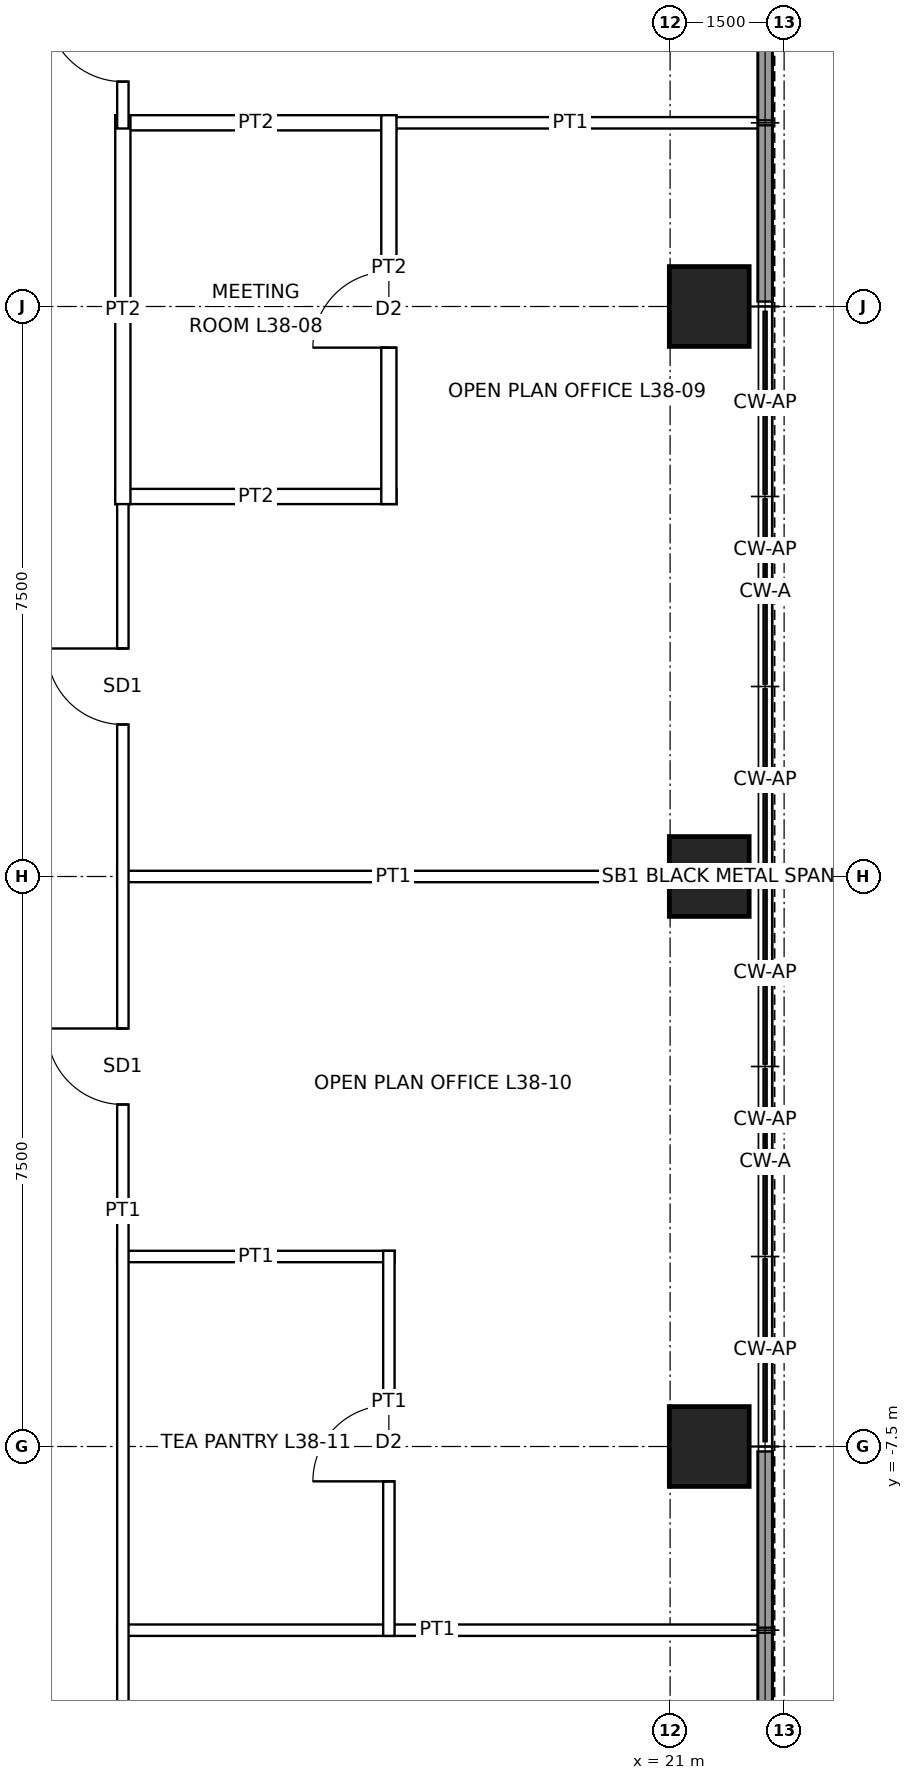
"""IFC4 building model, lengths in metres.
Left out: names, types, materials, properties, quantities, classifications, styles, units other than length and angle.
Written with IfcOpenShell. Run it as: python <this file> out.ifc"""

import sys

from ifc_helpers import new_model, si_unit, direction, frame, frame_2d, origin, origin_2d, place, context, subcontext, project, spatial, rectangle, hollow_rectangle, extrude, element, fill, save


model = new_model("IFC4")
c1 = context("Model", 3, precision=1e-05, world=origin(), true_north=direction((0.0, 1.0)))
c2 = subcontext(c1, "Body", "Model", "MODEL_VIEW")
j1 = project(units=[si_unit("LENGTHUNIT", "METRE"), si_unit("PLANEANGLEUNIT", "RADIAN")], contexts=[c1])
p1 = place(None, origin())
s1 = spatial("IfcSite", under=j1, at=p1, CompositionType="ELEMENT")
p2 = place(p1, origin())
s2 = spatial("IfcBuilding", under=s1, at=p2, CompositionType="ELEMENT")
p3 = place(p2, frame((0.0, 0.0, 185.9)))
s3 = spatial("IfcBuildingStorey", under=s2, at=p3, CompositionType="ELEMENT", Elevation=185.9)
for number, where, z_axis, x_axis in (
    (1, (21.515, 7.5, 0.0), (0.0, 0.0, 1.0), (1.0, 0.0, 0.0)),
    (2, (21.515, 0.0, 0.0), (0.0, 0.0, 1.0), (1.0, 0.0, 0.0)),
    (3, (21.515, -7.5, 0.0), (0.0, 0.0, 1.0), (1.0, 0.0, 0.0)),
):
    element("IfcColumn", number, at=place(p3, frame(where, z_axis=z_axis, x_axis=x_axis)), inside=s3, PredefinedType="COLUMN", context=c2, shape_type="SweptSolid", body=[
        extrude(hollow_rectangle(XDim=1.05, YDim=1.05, WallThickness=0.07, at=origin_2d()), origin(), (0.0, 0.0, 1.0), 4.0),
    ])
p4 = place(p3, frame((22.25, 12.301, 0.0), z_axis=(0.0, 0.0, 1.0), x_axis=(0.0, -1.0, 0.0)))
e4 = element("IfcWall", 4, at=p4, inside=s3, PredefinedType="SOLIDWALL", context=c2, shape_type="SweptSolid", body=[
    extrude(rectangle(XDim=2.352, YDim=0.2, at=frame_2d((1.176, 0.0))), origin(), (0.0, 0.0, 1.0), 3.85),
])
for number, where, z_axis, x_axis in (
    (5, (22.25, 9.884, 0.0), (0.0, 0.0, 1.0), (0.0, -1.0, 0.0)),
    (6, (22.25, -7.565, 0.0), (0.0, 0.0, 1.0), (0.0, -1.0, 0.0)),
):
    element("IfcWall", number, at=place(p3, frame(where, z_axis=z_axis, x_axis=x_axis)), inside=s3, PredefinedType="SOLIDWALL", context=c2, shape_type="SweptSolid", body=[
        extrude(rectangle(XDim=2.319, YDim=0.2, at=frame_2d((1.16, 0.0))), origin(), (0.0, 0.0, 1.0), 3.85),
    ])
p5 = place(p3, frame((22.25, -9.949, 0.0), z_axis=(0.0, 0.0, 1.0), x_axis=(0.0, -1.0, 0.0)))
e7 = element("IfcWall", 7, at=p5, inside=s3, PredefinedType="SOLIDWALL", context=c2, shape_type="SweptSolid", body=[
    extrude(rectangle(XDim=2.352, YDim=0.2, at=frame_2d((1.176, 0.0))), origin(), (0.0, 0.0, 1.0), 3.85),
])
p6 = place(p3, frame((13.725, -9.917, 0.0), z_axis=(0.0, 0.0, 1.0), x_axis=(1.0, 0.0, 0.0)))
e8 = element("IfcWall", 8, at=p6, inside=s3, PredefinedType="PARTITIONING", context=c2, shape_type="SweptSolid", body=[
    extrude(rectangle(XDim=8.425, YDim=0.15, at=frame_2d((4.212, 0.0))), origin(), (0.0, 0.0, 1.0), 3.85),
])
p7 = place(p3, frame((13.725, -5.0, 0.0), z_axis=(0.0, 0.0, 1.0), x_axis=(1.0, 0.0, 0.0)))
e9 = element("IfcWall", 9, at=p7, inside=s3, PredefinedType="PARTITIONING", context=c2, shape_type="SweptSolid", body=[
    extrude(rectangle(XDim=3.65, YDim=0.15, at=frame_2d((1.825, 0.0))), origin(), (0.0, 0.0, 1.0), 3.85),
])
p8 = place(p3, frame((13.725, 0.0, 0.0), z_axis=(0.0, 0.0, 1.0), x_axis=(1.0, 0.0, 0.0)))
e10 = element("IfcWall", 10, at=p8, inside=s3, PredefinedType="PARTITIONING", context=c2, shape_type="SweptSolid", body=[
    extrude(rectangle(XDim=7.265, YDim=0.15, at=frame_2d((3.632, 0.0))), origin(), (0.0, 0.0, 1.0), 3.238),
])
for number, where, z_axis, x_axis in (
    (11, (13.7, 5.0, 0.0), (0.0, 0.0, 1.0), (1.0, 0.0, 0.0)),
    (12, (13.7, 9.917, 0.0), (0.0, 0.0, 1.0), (1.0, 0.0, 0.0)),
):
    element("IfcWall", number, at=place(p3, frame(where, z_axis=z_axis, x_axis=x_axis)), inside=s3, PredefinedType="PARTITIONING", context=c2, shape_type="SweptSolid", body=[
        extrude(rectangle(XDim=3.7, YDim=0.2, at=frame_2d((1.85, 0.0))), origin(), (0.0, 0.0, 1.0), 3.85),
    ])
p9 = place(p3, frame((17.225, 9.917, 0.0), z_axis=(0.0, 0.0, 1.0), x_axis=(1.0, 0.0, 0.0)))
e13 = element("IfcWall", 13, at=p9, inside=s3, PredefinedType="PARTITIONING", context=c2, shape_type="SweptSolid", body=[
    extrude(rectangle(XDim=4.925, YDim=0.15, at=frame_2d((2.462, 0.0))), origin(), (0.0, 0.0, 1.0), 3.85),
])
p10 = place(p3, frame((13.8, -13.875, 0.0), z_axis=(0.0, 0.0, 1.0), x_axis=(0.0, 1.0, 0.0)))
e14 = element("IfcWall", 14, at=p10, inside=s3, PredefinedType="PARTITIONING", context=c2, shape_type="SweptSolid", body=[
    extrude(rectangle(XDim=18.95, YDim=0.15, at=frame_2d((9.475, 0.0))), origin(), (0.0, 0.0, 1.0), 3.85),
])
p11 = place(p10, frame((15.875, 0.0, 0.0)))
e15 = element("IfcOpeningElement", 15, at=p11, cuts=e14, PredefinedType="OPENING", context=c2, shape_type="SweptSolid", body=[
    extrude(rectangle(XDim=1.0, YDim=2.4, at=frame_2d((0.5, 1.2))), frame((0.0, 0.085, 0.0), z_axis=(0.0, -1.0, 0.0), x_axis=(1.0, 0.0, 0.0)), (0.0, 0.0, 1.0), 0.17),
])
p12 = place(p10, frame((10.875, 0.0, 0.0)))
e16 = element("IfcOpeningElement", 16, at=p12, cuts=e14, PredefinedType="OPENING", context=c2, shape_type="SweptSolid", body=[
    extrude(rectangle(XDim=1.0, YDim=2.4, at=frame_2d((0.5, 1.2))), frame((0.0, 0.085, 0.0), z_axis=(0.0, -1.0, 0.0), x_axis=(1.0, 0.0, 0.0)), (0.0, 0.0, 1.0), 0.17),
])
p13 = place(p3, frame((13.8, 4.9, 0.0), z_axis=(0.0, 0.0, 1.0), x_axis=(0.0, 1.0, 0.0)))
e17 = element("IfcWall", 17, at=p13, inside=s3, PredefinedType="PARTITIONING", context=c2, shape_type="SweptSolid", body=[
    extrude(rectangle(XDim=5.117, YDim=0.2, at=frame_2d((2.559, 0.0))), origin(), (0.0, 0.0, 1.0), 3.85),
])
p14 = place(p3, frame((13.8, 9.842, 0.0), z_axis=(0.0, 0.0, 1.0), x_axis=(0.0, 1.0, 0.0)))
e18 = element("IfcWall", 18, at=p14, inside=s3, PredefinedType="PARTITIONING", context=c2, shape_type="SweptSolid", body=[
    extrude(rectangle(XDim=2.233, YDim=0.15, at=frame_2d((1.116, 0.0))), origin(), (0.0, 0.0, 1.0), 3.85),
])
p15 = place(p14, frame((0.616, 0.0, 0.0)))
e19 = element("IfcOpeningElement", 19, at=p15, cuts=e18, PredefinedType="OPENING", context=c2, shape_type="SweptSolid", body=[
    extrude(rectangle(XDim=1.0, YDim=2.4, at=frame_2d((0.5, 1.2))), frame((0.0, 0.085, 0.0), z_axis=(0.0, -1.0, 0.0), x_axis=(1.0, 0.0, 0.0)), (0.0, 0.0, 1.0), 0.17),
])
p16 = place(p3, frame((17.3, -9.992, 0.0), z_axis=(0.0, 0.0, 1.0), x_axis=(0.0, 1.0, 0.0)))
e20 = element("IfcWall", 20, at=p16, inside=s3, PredefinedType="PARTITIONING", context=c2, shape_type="SweptSolid", body=[
    extrude(rectangle(XDim=5.067, YDim=0.15, at=frame_2d((2.533, 0.0))), origin(), (0.0, 0.0, 1.0), 3.85),
])
p17 = place(p16, frame((2.033, 0.0, 0.0)))
e21 = element("IfcOpeningElement", 21, at=p17, cuts=e20, PredefinedType="OPENING", context=c2, shape_type="SweptSolid", body=[
    extrude(rectangle(XDim=1.0, YDim=2.1, at=frame_2d((0.5, 1.05))), frame((0.0, 0.085, 0.0), z_axis=(0.0, -1.0, 0.0), x_axis=(1.0, 0.0, 0.0)), (0.0, 0.0, 1.0), 0.17),
])
p18 = place(p3, frame((17.3, 4.9, 0.0), z_axis=(0.0, 0.0, 1.0), x_axis=(0.0, 1.0, 0.0)))
e22 = element("IfcWall", 22, at=p18, inside=s3, PredefinedType="PARTITIONING", context=c2, shape_type="SweptSolid", body=[
    extrude(rectangle(XDim=5.117, YDim=0.2, at=frame_2d((2.559, 0.0))), origin(), (0.0, 0.0, 1.0), 3.85),
])
p19 = place(p18, frame((2.059, 0.0, 0.0)))
e23 = element("IfcOpeningElement", 23, at=p19, cuts=e22, PredefinedType="OPENING", context=c2, shape_type="SweptSolid", body=[
    extrude(rectangle(XDim=1.0, YDim=2.1, at=frame_2d((0.5, 1.05))), frame((0.0, 0.11, 0.0), z_axis=(0.0, -1.0, 0.0), x_axis=(1.0, 0.0, 0.0)), (0.0, 0.0, 1.0), 0.22),
])
p20 = place(p19, origin())
e24 = element("IfcDoor", 24, at=p20, inside=s3, OperationType="SINGLE_SWING_LEFT", PredefinedType="DOOR", context=c2, shape_type="SweptSolid", body=[
    extrude(rectangle(XDim=1.0, YDim=2.1, at=frame_2d((0.5, 1.05))), frame((0.0, 0.025, 0.0), z_axis=(0.0, -1.0, 0.0), x_axis=(1.0, 0.0, 0.0)), (0.0, 0.0, 1.0), 0.05),
])
fill(e23, e24)
p21 = place(p11, origin())
e25 = element("IfcDoor", 25, at=p21, inside=s3, OperationType="SINGLE_SWING_RIGHT", PredefinedType="DOOR", context=c2, shape_type="SweptSolid", body=[
    extrude(rectangle(XDim=1.0, YDim=2.4, at=frame_2d((0.5, 1.2))), frame((0.0, 0.025, 0.0), z_axis=(0.0, -1.0, 0.0), x_axis=(1.0, 0.0, 0.0)), (0.0, 0.0, 1.0), 0.05),
])
fill(e15, e25)
p22 = place(p12, origin())
e26 = element("IfcDoor", 26, at=p22, inside=s3, OperationType="SINGLE_SWING_RIGHT", PredefinedType="DOOR", context=c2, shape_type="SweptSolid", body=[
    extrude(rectangle(XDim=1.0, YDim=2.4, at=frame_2d((0.5, 1.2))), frame((0.0, 0.025, 0.0), z_axis=(0.0, -1.0, 0.0), x_axis=(1.0, 0.0, 0.0)), (0.0, 0.0, 1.0), 0.05),
])
fill(e16, e26)
p23 = place(p17, origin())
e27 = element("IfcDoor", 27, at=p23, inside=s3, OperationType="SINGLE_SWING_LEFT", PredefinedType="DOOR", context=c2, shape_type="SweptSolid", body=[
    extrude(rectangle(XDim=1.0, YDim=2.1, at=frame_2d((0.5, 1.05))), frame((0.0, 0.025, 0.0), z_axis=(0.0, -1.0, 0.0), x_axis=(1.0, 0.0, 0.0)), (0.0, 0.0, 1.0), 0.05),
])
fill(e21, e27)
p24 = place(p15, origin())
e28 = element("IfcDoor", 28, at=p24, inside=s3, OperationType="SINGLE_SWING_RIGHT", PredefinedType="DOOR", context=c2, shape_type="SweptSolid", body=[
    extrude(rectangle(XDim=1.0, YDim=2.4, at=frame_2d((0.5, 1.2))), frame((0.0, 0.025, 0.0), z_axis=(0.0, -1.0, 0.0), x_axis=(1.0, 0.0, 0.0)), (0.0, 0.0, 1.0), 0.05),
])
fill(e19, e28)
save(model, sys.argv[1])
